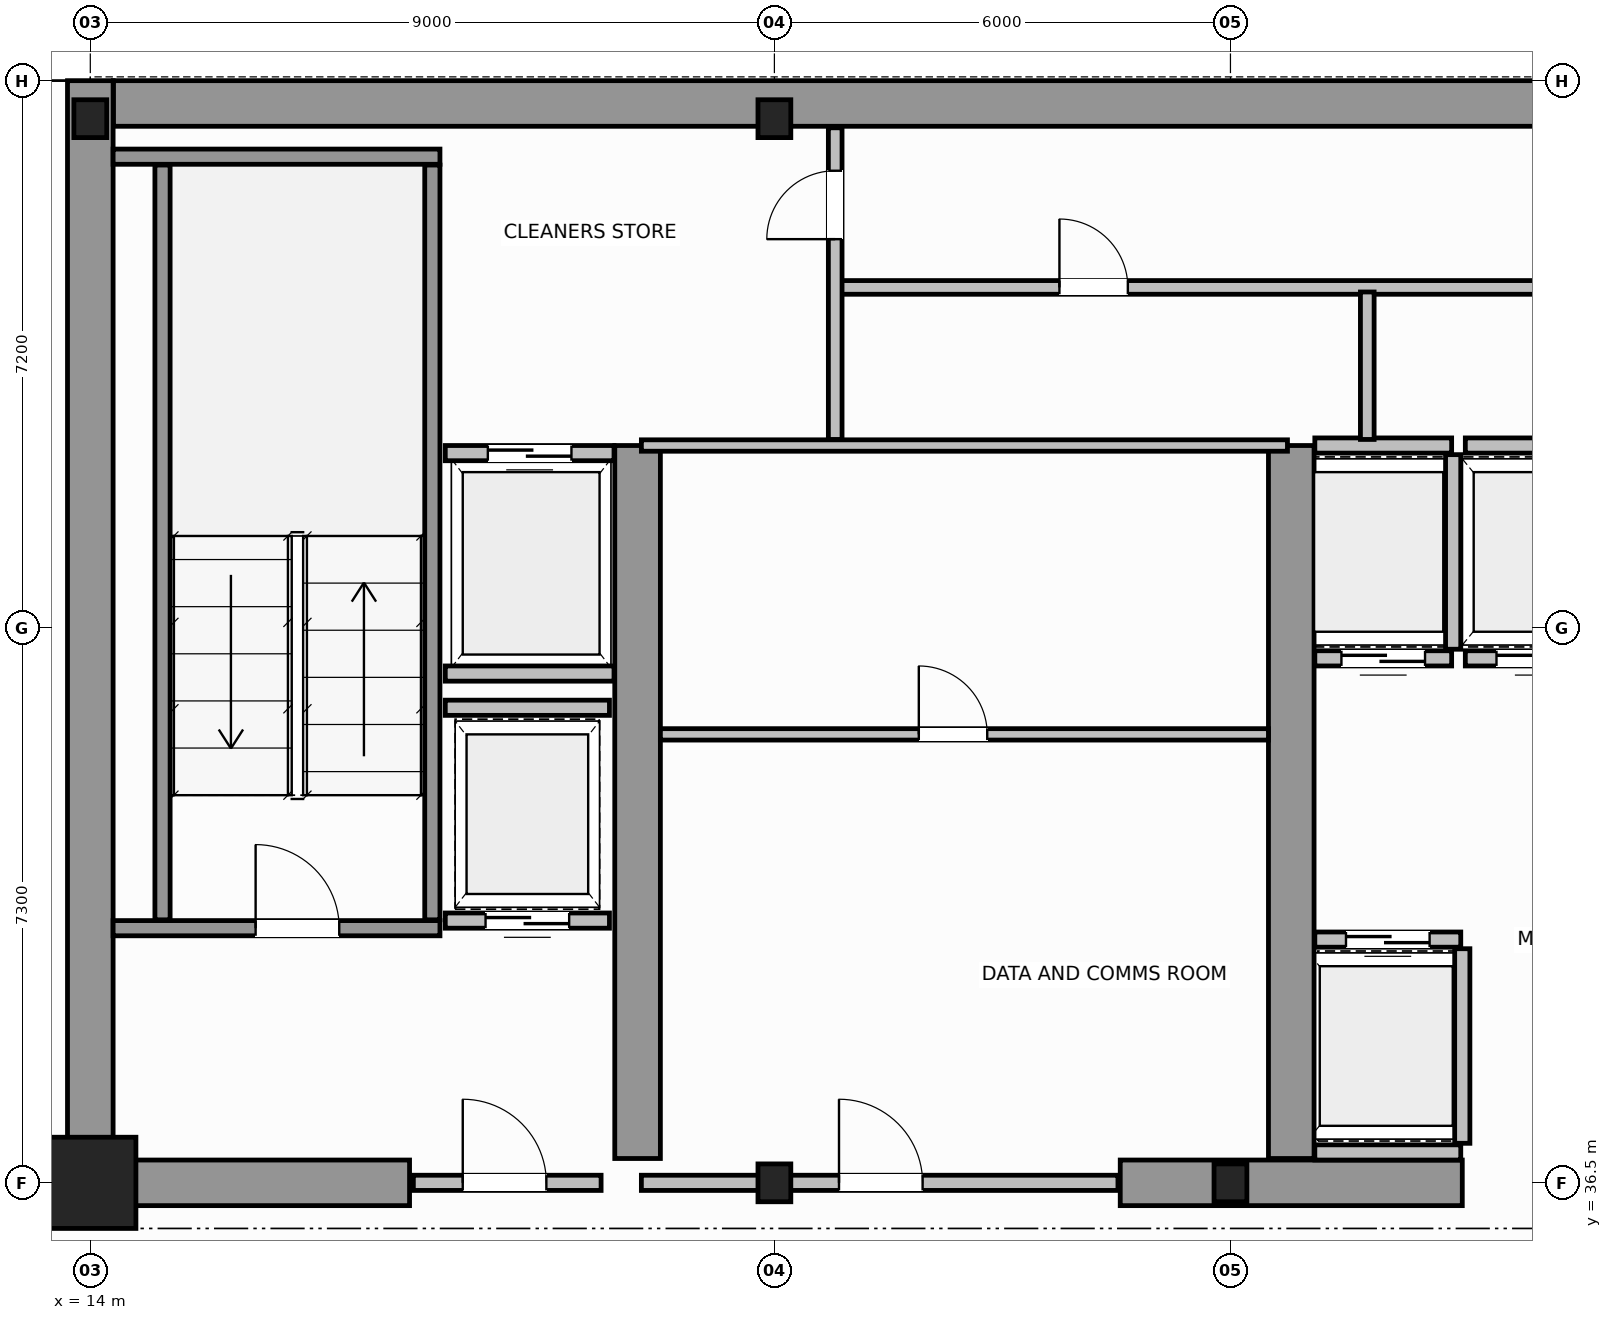
"""IFC4 building model, lengths in metres.
Left out: names, types, materials, properties, quantities, classifications, styles, units other than length and angle.
Written with IfcOpenShell. Run it as: python <this file> out.ifc"""

import sys

from ifc_helpers import new_model, si_unit, direction, frame, frame_2d, origin, origin_2d, place, context, subcontext, project, spatial, rectangle, i_section, extrude, source, transform, mapped, element, fill, save


model = new_model("IFC4")
c1 = context("Model", 3, precision=1e-05, world=origin(), true_north=direction((0.0, 1.0)))
c2 = subcontext(c1, "Body", "Model", "MODEL_VIEW")
j1 = project(units=[si_unit("LENGTHUNIT", "METRE"), si_unit("PLANEANGLEUNIT", "RADIAN")], contexts=[c1])
p1 = place(None, origin())
s1 = spatial("IfcSite", under=j1, at=p1, CompositionType="ELEMENT")
p2 = place(p1, origin())
s2 = spatial("IfcBuilding", under=s1, at=p2, CompositionType="ELEMENT")
p3 = place(p2, frame((0.0, 0.0, 184.2)))
s3 = spatial("IfcBuildingStorey", under=s2, at=p3, CompositionType="ELEMENT", Elevation=184.2)
m1 = source(origin(), c2, "Body", "SweptSolid", [
    extrude(rectangle(XDim=1.2, YDim=1.2, at=origin_2d()), origin(), (0.0, 0.0, 1.0), 3.8),
])
p4 = place(p3, frame((14.0, 36.5, 0.0), z_axis=(0.0, 0.0, 1.0), x_axis=(1.0, 0.0, 0.0)))
e1 = element("IfcColumn", 1, at=p4, inside=s3, PredefinedType="COLUMN", context=c2, shape_type="MappedRepresentation", body=[
    mapped(m1, transform((0.0, 0.0, 0.0), scale=1.0)),
])
m2 = source(origin(), c2, "Body", "SweptSolid", [
    extrude(i_section(OverallWidth=0.432, OverallDepth=0.498, WebThickness=0.055, FlangeThickness=0.068, FilletRadius=0.015, at=origin_2d()), origin(), (0.0, 0.0, 1.0), 3.8),
])
for number, where, z_axis, x_axis in (
    (2, (23.0, 36.5, 0.0), (0.0, 0.0, 1.0), (1.0, 0.0, 0.0)),
    (3, (29.0, 36.5, 0.0), (0.0, 0.0, 1.0), (1.0, 0.0, 0.0)),
    (4, (14.0, 50.5, 0.0), (0.0, 0.0, 1.0), (1.0, 0.0, 0.0)),
    (5, (23.0, 50.5, 0.0), (0.0, 0.0, 1.0), (1.0, 0.0, 0.0)),
):
    element("IfcColumn", number, at=place(p3, frame(where, z_axis=z_axis, x_axis=x_axis)), inside=s3, PredefinedType="COLUMN", context=c2, shape_type="MappedRepresentation", body=[
        mapped(m2, transform((0.0, 0.0, 0.0), scale=1.0)),
    ])
p5 = place(p3, frame((14.304, 50.7, 0.0), z_axis=(0.0, 0.0, 1.0), x_axis=(1.0, 0.0, 0.0)))
e6 = element("IfcWall", 6, at=p5, inside=s3, PredefinedType="SHEAR", context=c2, shape_type="SweptSolid", body=[
    extrude(rectangle(XDim=19.694, YDim=0.6, at=frame_2d((9.847, 0.0))), origin(), (0.0, 0.0, 1.0), 3.8),
])
p6 = place(p3, frame((14.0, 36.5, 0.0), z_axis=(0.0, 0.0, 1.0), x_axis=(0.0, 1.0, 0.0)))
e7 = element("IfcWall", 7, at=p6, inside=s3, PredefinedType="SHEAR", context=c2, shape_type="SweptSolid", body=[
    extrude(rectangle(XDim=14.5, YDim=0.6, at=frame_2d((7.25, 0.0))), origin(), (0.0, 0.0, 1.0), 3.8),
])
p7 = place(p3, frame((14.32, 36.5, 0.0), z_axis=(0.0, 0.0, 1.0), x_axis=(1.0, 0.0, 0.0)))
e8 = element("IfcWall", 8, at=p7, inside=s3, PredefinedType="SHEAR", context=c2, shape_type="SweptSolid", body=[
    extrude(rectangle(XDim=3.88, YDim=0.6, at=frame_2d((1.94, 0.0))), origin(), (0.0, 0.0, 1.0), 2.58),
])
p8 = place(p3, frame((27.55, 36.5, 0.0), z_axis=(0.0, 0.0, 1.0), x_axis=(1.0, 0.0, 0.0)))
e9 = element("IfcWall", 9, at=p8, inside=s3, PredefinedType="SHEAR", context=c2, shape_type="SweptSolid", body=[
    extrude(rectangle(XDim=4.5, YDim=0.6, at=frame_2d((2.25, 0.0))), origin(), (0.0, 0.0, 1.0), 3.8),
])
for number, where, z_axis, x_axis in (
    (10, (21.2, 36.82, 0.0), (0.0, 0.0, 1.0), (0.0, 1.0, 0.0)),
    (11, (29.8, 36.82, 0.0), (0.0, 0.0, 1.0), (0.0, 1.0, 0.0)),
):
    element("IfcWall", number, at=place(p3, frame(where, z_axis=z_axis, x_axis=x_axis)), inside=s3, PredefinedType="SHEAR", context=c2, shape_type="SweptSolid", body=[
        extrude(rectangle(XDim=9.38, YDim=0.6, at=frame_2d((4.69, 0.0))), origin(), (0.0, 0.0, 1.0), 3.8),
    ])
p9 = place(p3, frame((14.3, 39.85, 0.0), z_axis=(0.0, 0.0, 1.0), x_axis=(1.0, 0.0, 0.0)))
e12 = element("IfcWall", 12, at=p9, inside=s3, PredefinedType="SOLIDWALL", context=c2, shape_type="SweptSolid", body=[
    extrude(rectangle(XDim=4.3, YDim=0.2, at=frame_2d((2.15, 0.0))), origin(), (0.0, 0.0, 1.0), 3.8),
])
p10 = place(p9, frame((1.875, 0.0, 0.0)))
e13 = element("IfcOpeningElement", 13, at=p10, cuts=e12, PredefinedType="OPENING", context=c2, shape_type="SweptSolid", body=[
    extrude(rectangle(XDim=1.1, YDim=2.15, at=frame_2d((0.55, 1.075))), frame((0.0, 0.11, 0.0), z_axis=(0.0, -1.0, 0.0), x_axis=(1.0, 0.0, 0.0)), (0.0, 0.0, 1.0), 0.22),
])
p11 = place(p3, frame((14.3, 50.0, 0.0), z_axis=(0.0, 0.0, 1.0), x_axis=(1.0, 0.0, 0.0)))
e14 = element("IfcWall", 14, at=p11, inside=s3, PredefinedType="SOLIDWALL", context=c2, shape_type="SweptSolid", body=[
    extrude(rectangle(XDim=4.3, YDim=0.2, at=frame_2d((2.15, 0.0))), origin(), (0.0, 0.0, 1.0), 3.8),
])
for number, where, z_axis, x_axis in (
    (15, (14.95, 39.96, 0.0), (0.0, 0.0, 1.0), (0.0, 1.0, 0.0)),
    (16, (18.5, 39.96, 0.0), (0.0, 0.0, 1.0), (0.0, 1.0, 0.0)),
):
    element("IfcWall", number, at=place(p3, frame(where, z_axis=z_axis, x_axis=x_axis)), inside=s3, PredefinedType="SOLIDWALL", context=c2, shape_type="SweptSolid", body=[
        extrude(rectangle(XDim=9.93, YDim=0.2, at=frame_2d((4.965, 0.0))), origin(), (0.0, 0.0, 1.0), 3.8),
    ])
p12 = place(p3, frame((18.25, 36.5, 0.0), z_axis=(0.0, 0.0, 1.0), x_axis=(1.0, 0.0, 0.0)))
e17 = element("IfcWall", 17, at=p12, inside=s3, PredefinedType="SOLIDWALL", context=c2, shape_type="SweptSolid", body=[
    extrude(rectangle(XDim=2.47, YDim=0.2, at=frame_2d((1.235, 0.0))), origin(), (0.0, 0.0, 1.0), 2.57),
])
p13 = place(p12, frame((0.65, 0.0, 0.0)))
e18 = element("IfcOpeningElement", 18, at=p13, cuts=e17, PredefinedType="OPENING", context=c2, shape_type="SweptSolid", body=[
    extrude(rectangle(XDim=1.1, YDim=2.15, at=frame_2d((0.55, 1.075))), frame((0.0, 0.11, 0.0), z_axis=(0.0, -1.0, 0.0), x_axis=(1.0, 0.0, 0.0)), (0.0, 0.0, 1.0), 0.22),
])
p14 = place(p3, frame((30.11, 39.7, 0.0), z_axis=(0.0, 0.0, 1.0), x_axis=(1.0, 0.0, 0.0)))
e19 = element("IfcWall", 19, at=p14, inside=s3, PredefinedType="SOLIDWALL", context=c2, shape_type="SweptSolid", body=[
    extrude(rectangle(XDim=1.92, YDim=0.2, at=frame_2d((0.96, 0.0))), origin(), (0.0, 0.0, 1.0), 3.58),
])
p15 = place(p14, frame((0.41, 0.0, 0.0)))
e20 = element("IfcOpeningElement", 20, at=p15, cuts=e19, PredefinedType="OPENING", context=c2, shape_type="SweptSolid", body=[
    extrude(rectangle(XDim=1.1, YDim=2.15, at=frame_2d((0.55, 1.075))), frame((0.0, 0.11, 0.0), z_axis=(0.0, -1.0, 0.0), x_axis=(1.0, 0.0, 0.0)), (0.0, 0.0, 1.0), 0.22),
])
p16 = place(p3, frame((30.11, 36.9, 0.0), z_axis=(0.0, 0.0, 1.0), x_axis=(1.0, 0.0, 0.0)))
e21 = element("IfcWall", 21, at=p16, inside=s3, PredefinedType="SOLIDWALL", context=c2, shape_type="SweptSolid", body=[
    extrude(rectangle(XDim=1.92, YDim=0.2, at=frame_2d((0.96, 0.0))), origin(), (0.0, 0.0, 1.0), 3.58),
])
p17 = place(p3, frame((32.05, 37.02, 0.0), z_axis=(0.0, 0.0, 1.0), x_axis=(0.0, 1.0, 0.0)))
e22 = element("IfcWall", 22, at=p17, inside=s3, PredefinedType="SOLIDWALL", context=c2, shape_type="SweptSolid", body=[
    extrude(rectangle(XDim=2.56, YDim=0.2, at=frame_2d((1.28, 0.0))), origin(), (0.0, 0.0, 1.0), 3.58),
])
p18 = place(p3, frame((30.11, 43.4, 0.0), z_axis=(0.0, 0.0, 1.0), x_axis=(1.0, 0.0, 0.0)))
e23 = element("IfcWall", 23, at=p18, inside=s3, PredefinedType="SOLIDWALL", context=c2, shape_type="SweptSolid", body=[
    extrude(rectangle(XDim=1.8, YDim=0.2, at=frame_2d((0.9, 0.0))), origin(), (0.0, 0.0, 1.0), 3.58),
])
p19 = place(p18, frame((0.35, 0.0, 0.0)))
e24 = element("IfcOpeningElement", 24, at=p19, cuts=e23, PredefinedType="OPENING", context=c2, shape_type="SweptSolid", body=[
    extrude(rectangle(XDim=1.1, YDim=2.15, at=frame_2d((0.55, 1.075))), frame((0.0, 0.11, 0.0), z_axis=(0.0, -1.0, 0.0), x_axis=(1.0, 0.0, 0.0)), (0.0, 0.0, 1.0), 0.22),
])
p20 = place(p3, frame((30.11, 46.2, 0.0), z_axis=(0.0, 0.0, 1.0), x_axis=(1.0, 0.0, 0.0)))
e25 = element("IfcWall", 25, at=p20, inside=s3, PredefinedType="SOLIDWALL", context=c2, shape_type="SweptSolid", body=[
    extrude(rectangle(XDim=1.8, YDim=0.2, at=frame_2d((0.9, 0.0))), origin(), (0.0, 0.0, 1.0), 3.58),
])
p21 = place(p3, frame((31.93, 43.52, 0.0), z_axis=(0.0, 0.0, 1.0), x_axis=(0.0, 1.0, 0.0)))
e26 = element("IfcWall", 26, at=p21, inside=s3, PredefinedType="SOLIDWALL", context=c2, shape_type="SweptSolid", body=[
    extrude(rectangle(XDim=2.56, YDim=0.2, at=frame_2d((1.28, 0.0))), origin(), (0.0, 0.0, 1.0), 3.58),
])
p22 = place(p3, frame((32.09, 43.4, 0.0), z_axis=(0.0, 0.0, 1.0), x_axis=(1.0, 0.0, 0.0)))
e27 = element("IfcWall", 27, at=p22, inside=s3, PredefinedType="SOLIDWALL", context=c2, shape_type="SweptSolid", body=[
    extrude(rectangle(XDim=1.92, YDim=0.2, at=frame_2d((0.96, 0.0))), origin(), (0.0, 0.0, 1.0), 3.58),
])
p23 = place(p22, frame((0.41, 0.0, 0.0)))
e28 = element("IfcOpeningElement", 28, at=p23, cuts=e27, PredefinedType="OPENING", context=c2, shape_type="SweptSolid", body=[
    extrude(rectangle(XDim=1.1, YDim=2.15, at=frame_2d((0.55, 1.075))), frame((0.0, 0.11, 0.0), z_axis=(0.0, -1.0, 0.0), x_axis=(1.0, 0.0, 0.0)), (0.0, 0.0, 1.0), 0.22),
])
p24 = place(p3, frame((32.09, 46.2, 0.0), z_axis=(0.0, 0.0, 1.0), x_axis=(1.0, 0.0, 0.0)))
e29 = element("IfcWall", 29, at=p24, inside=s3, PredefinedType="SOLIDWALL", context=c2, shape_type="SweptSolid", body=[
    extrude(rectangle(XDim=1.92, YDim=0.2, at=frame_2d((0.96, 0.0))), origin(), (0.0, 0.0, 1.0), 3.58),
])
p25 = place(p3, frame((18.67, 46.1, 0.0), z_axis=(0.0, 0.0, 1.0), x_axis=(1.0, 0.0, 0.0)))
e30 = element("IfcWall", 30, at=p25, inside=s3, PredefinedType="SOLIDWALL", context=c2, shape_type="SweptSolid", body=[
    extrude(rectangle(XDim=2.22, YDim=0.2, at=frame_2d((1.11, 0.0))), origin(), (0.0, 0.0, 1.0), 3.58),
])
p26 = place(p25, frame((0.56, 0.0, 0.0)))
e31 = element("IfcOpeningElement", 31, at=p26, cuts=e30, PredefinedType="OPENING", context=c2, shape_type="SweptSolid", body=[
    extrude(rectangle(XDim=1.1, YDim=2.15, at=frame_2d((0.55, 1.075))), frame((0.0, 0.11, 0.0), z_axis=(0.0, -1.0, 0.0), x_axis=(1.0, 0.0, 0.0)), (0.0, 0.0, 1.0), 0.22),
])
p27 = place(p3, frame((18.67, 43.2, 0.0), z_axis=(0.0, 0.0, 1.0), x_axis=(1.0, 0.0, 0.0)))
e32 = element("IfcWall", 32, at=p27, inside=s3, PredefinedType="SOLIDWALL", context=c2, shape_type="SweptSolid", body=[
    extrude(rectangle(XDim=2.22, YDim=0.2, at=frame_2d((1.11, 0.0))), origin(), (0.0, 0.0, 1.0), 3.58),
])
p28 = place(p3, frame((18.67, 39.95, 0.0), z_axis=(0.0, 0.0, 1.0), x_axis=(1.0, 0.0, 0.0)))
e33 = element("IfcWall", 33, at=p28, inside=s3, PredefinedType="SOLIDWALL", context=c2, shape_type="SweptSolid", body=[
    extrude(rectangle(XDim=2.16, YDim=0.2, at=frame_2d((1.08, 0.0))), origin(), (0.0, 0.0, 1.0), 3.58),
])
p29 = place(p28, frame((0.53, 0.0, 0.0)))
e34 = element("IfcOpeningElement", 34, at=p29, cuts=e33, PredefinedType="OPENING", context=c2, shape_type="SweptSolid", body=[
    extrude(rectangle(XDim=1.1, YDim=2.15, at=frame_2d((0.55, 1.075))), frame((0.0, 0.11, 0.0), z_axis=(0.0, -1.0, 0.0), x_axis=(1.0, 0.0, 0.0)), (0.0, 0.0, 1.0), 0.22),
])
p30 = place(p3, frame((18.67, 42.75, 0.0), z_axis=(0.0, 0.0, 1.0), x_axis=(1.0, 0.0, 0.0)))
e35 = element("IfcWall", 35, at=p30, inside=s3, PredefinedType="SOLIDWALL", context=c2, shape_type="SweptSolid", body=[
    extrude(rectangle(XDim=2.16, YDim=0.2, at=frame_2d((1.08, 0.0))), origin(), (0.0, 0.0, 1.0), 3.58),
])
p31 = place(p3, frame((21.25, 36.5, 0.0), z_axis=(0.0, 0.0, 1.0), x_axis=(1.0, 0.0, 0.0)))
e36 = element("IfcWall", 36, at=p31, inside=s3, PredefinedType="SOLIDWALL", context=c2, shape_type="SweptSolid", body=[
    extrude(rectangle(XDim=6.27, YDim=0.2, at=frame_2d((3.135, 0.0))), origin(), (0.0, 0.0, 1.0), 2.57),
])
p32 = place(p31, frame((2.6, 0.0, 0.0)))
e37 = element("IfcOpeningElement", 37, at=p32, cuts=e36, PredefinedType="OPENING", context=c2, shape_type="SweptSolid", body=[
    extrude(rectangle(XDim=1.1, YDim=2.15, at=frame_2d((0.55, 1.075))), frame((0.0, 0.11, 0.0), z_axis=(0.0, -1.0, 0.0), x_axis=(1.0, 0.0, 0.0)), (0.0, 0.0, 1.0), 0.22),
])
p33 = place(p3, frame((21.25, 46.2, 0.0), z_axis=(0.0, 0.0, 1.0), x_axis=(1.0, 0.0, 0.0)))
e38 = element("IfcWall", 38, at=p33, inside=s3, PredefinedType="PARTITIONING", context=c2, shape_type="SweptSolid", body=[
    extrude(rectangle(XDim=8.5, YDim=0.15, at=frame_2d((4.25, 0.0))), origin(), (0.0, 0.0, 1.0), 3.58),
])
p34 = place(p3, frame((21.5, 42.4, 0.0), z_axis=(0.0, 0.0, 1.0), x_axis=(1.0, 0.0, 0.0)))
e39 = element("IfcWall", 39, at=p34, inside=s3, PredefinedType="PARTITIONING", context=c2, shape_type="SweptSolid", body=[
    extrude(rectangle(XDim=8.0, YDim=0.15, at=frame_2d((4.0, 0.0))), origin(), (0.0, 0.0, 1.0), 3.58),
])
p35 = place(p34, frame((3.4, 0.0, 0.0)))
e40 = element("IfcOpeningElement", 40, at=p35, cuts=e39, PredefinedType="OPENING", context=c2, shape_type="SweptSolid", body=[
    extrude(rectangle(XDim=0.9, YDim=2.1, at=frame_2d((0.45, 1.05))), frame((0.0, 0.085, 0.0), z_axis=(0.0, -1.0, 0.0), x_axis=(1.0, 0.0, 0.0)), (0.0, 0.0, 1.0), 0.17),
])
p36 = place(p3, frame((23.85, 48.28, 0.0), z_axis=(0.0, 0.0, 1.0), x_axis=(1.0, 0.0, 0.0)))
e41 = element("IfcWall", 41, at=p36, inside=s3, PredefinedType="PLUMBINGWALL", context=c2, shape_type="SweptSolid", body=[
    extrude(rectangle(XDim=15.03, YDim=0.18, at=frame_2d((7.515, 0.0))), origin(), (0.0, 0.0, 1.0), 3.58),
])
p37 = place(p36, frame((2.9, 0.0, 0.0)))
e42 = element("IfcOpeningElement", 42, at=p37, cuts=e41, PredefinedType="OPENING", context=c2, shape_type="SweptSolid", body=[
    extrude(rectangle(XDim=0.9, YDim=2.15, at=frame_2d((0.45, 1.075))), frame((0.0, 0.1, 0.0), z_axis=(0.0, -1.0, 0.0), x_axis=(1.0, 0.0, 0.0)), (0.0, 0.0, 1.0), 0.2),
])
p38 = place(p36, frame((10.4, 0.0, 0.0)))
e43 = element("IfcOpeningElement", 43, at=p38, cuts=e41, PredefinedType="OPENING", context=c2, shape_type="SweptSolid", body=[
    extrude(rectangle(XDim=0.9, YDim=2.15, at=frame_2d((0.45, 1.075))), frame((0.0, 0.1, 0.0), z_axis=(0.0, -1.0, 0.0), x_axis=(1.0, 0.0, 0.0)), (0.0, 0.0, 1.0), 0.2),
])
p39 = place(p3, frame((23.8, 46.28, 0.0), z_axis=(0.0, 0.0, 1.0), x_axis=(0.0, 1.0, 0.0)))
e44 = element("IfcWall", 44, at=p39, inside=s3, PredefinedType="PLUMBINGWALL", context=c2, shape_type="SweptSolid", body=[
    extrude(rectangle(XDim=4.1, YDim=0.18, at=frame_2d((2.05, 0.0))), origin(), (0.0, 0.0, 1.0), 3.58),
])
p40 = place(p39, frame((2.635, 0.0, 0.0)))
e45 = element("IfcOpeningElement", 45, at=p40, cuts=e44, PredefinedType="OPENING", context=c2, shape_type="SweptSolid", body=[
    extrude(rectangle(XDim=0.9, YDim=2.15, at=frame_2d((0.45, 1.075))), frame((0.0, 0.1, 0.0), z_axis=(0.0, -1.0, 0.0), x_axis=(1.0, 0.0, 0.0)), (0.0, 0.0, 1.0), 0.2),
])
p41 = place(p3, frame((30.8, 46.28, 0.0), z_axis=(0.0, 0.0, 1.0), x_axis=(0.0, 1.0, 0.0)))
e46 = element("IfcWall", 46, at=p41, inside=s3, PredefinedType="PLUMBINGWALL", context=c2, shape_type="SweptSolid", body=[
    extrude(rectangle(XDim=1.94, YDim=0.18, at=frame_2d((0.97, 0.0))), origin(), (0.0, 0.0, 1.0), 3.58),
])
p42 = place(p3, frame((7.289, 36.48, 0.0), z_axis=(0.0, 0.0, 1.0), x_axis=(1.0, 0.0, 0.0)))
e47 = element("IfcWall", 47, at=p42, inside=s3, PredefinedType="PARTITIONING", context=c2, shape_type="SweptSolid", body=[
    extrude(rectangle(XDim=6.651, YDim=0.12, at=frame_2d((3.325, 0.0))), origin(), (0.0, 0.0, 1.0), 2.97),
])
p43 = place(p42, frame((2.875, 0.0, 0.0)))
e48 = element("IfcOpeningElement", 48, at=p43, cuts=e47, PredefinedType="OPENING", context=c2, shape_type="SweptSolid", body=[
    extrude(rectangle(XDim=0.9, YDim=2.15, at=frame_2d((0.45, 1.075))), frame((0.0, 0.07, 0.0), z_axis=(0.0, -1.0, 0.0), x_axis=(1.0, 0.0, 0.0)), (0.0, 0.0, 1.0), 0.14),
])
m3 = source(origin(), c2, "Body", "SweptSolid", [
    extrude(rectangle(XDim=1.1, YDim=2.15, at=frame_2d((0.55, 1.075))), frame((0.0, 0.025, 0.0), z_axis=(0.0, -1.0, 0.0), x_axis=(1.0, 0.0, 0.0)), (0.0, 0.0, 1.0), 0.05),
])
p44 = place(p10, origin())
e49 = element("IfcDoor", 49, at=p44, inside=s3, OperationType="SINGLE_SWING_LEFT", PredefinedType="DOOR", context=c2, shape_type="MappedRepresentation", body=[
    mapped(m3, transform((0.0, 0.0, 0.0), scale=1.0)),
])
fill(e13, e49)
p45 = place(p13, origin())
e50 = element("IfcDoor", 50, at=p45, inside=s3, OperationType="SINGLE_SWING_RIGHT", PredefinedType="DOOR", context=c2, shape_type="MappedRepresentation", body=[
    mapped(m3, transform((0.0, 0.0, 0.0), scale=1.0)),
])
fill(e18, e50)
p46 = place(p15, origin())
e51 = element("IfcDoor", 51, at=p46, inside=s3, OperationType="DOUBLE_DOOR_SLIDING", PredefinedType="DOOR", context=c2, shape_type="MappedRepresentation", body=[
    mapped(m3, transform((0.0, 0.0, 0.0), scale=1.0)),
])
fill(e20, e51)
p47 = place(p19, origin())
e52 = element("IfcDoor", 52, at=p47, inside=s3, OperationType="DOUBLE_DOOR_SLIDING", PredefinedType="DOOR", context=c2, shape_type="MappedRepresentation", body=[
    mapped(m3, transform((0.0, 0.0, 0.0), scale=1.0)),
])
fill(e24, e52)
p48 = place(p23, origin())
e53 = element("IfcDoor", 53, at=p48, inside=s3, OperationType="DOUBLE_DOOR_SLIDING", PredefinedType="DOOR", context=c2, shape_type="MappedRepresentation", body=[
    mapped(m3, transform((0.0, 0.0, 0.0), scale=1.0)),
])
fill(e28, e53)
p49 = place(p26, origin())
e54 = element("IfcDoor", 54, at=p49, inside=s3, OperationType="DOUBLE_DOOR_SLIDING", PredefinedType="DOOR", context=c2, shape_type="MappedRepresentation", body=[
    mapped(m3, transform((0.0, 0.0, 0.0), scale=1.0)),
])
fill(e31, e54)
p50 = place(p29, origin())
e55 = element("IfcDoor", 55, at=p50, inside=s3, OperationType="DOUBLE_DOOR_SLIDING", PredefinedType="DOOR", context=c2, shape_type="MappedRepresentation", body=[
    mapped(m3, transform((0.0, 0.0, 0.0), scale=1.0)),
])
fill(e34, e55)
p51 = place(p32, origin())
e56 = element("IfcDoor", 56, at=p51, inside=s3, OperationType="SINGLE_SWING_LEFT", PredefinedType="DOOR", context=c2, shape_type="MappedRepresentation", body=[
    mapped(m3, transform((0.0, 0.0, 0.0), scale=1.0)),
])
fill(e37, e56)
m4 = source(origin(), c2, "Body", "SweptSolid", [
    extrude(rectangle(XDim=0.9, YDim=2.1, at=frame_2d((0.45, 1.05))), frame((0.0, 0.025, 0.0), z_axis=(0.0, -1.0, 0.0), x_axis=(1.0, 0.0, 0.0)), (0.0, 0.0, 1.0), 0.05),
])
p52 = place(p35, origin())
e57 = element("IfcDoor", 57, at=p52, inside=s3, OperationType="SINGLE_SWING_RIGHT", PredefinedType="DOOR", context=c2, shape_type="MappedRepresentation", body=[
    mapped(m4, transform((0.0, 0.0, 0.0), scale=1.0)),
])
fill(e40, e57)
m5 = source(origin(), c2, "Body", "SweptSolid", [
    extrude(rectangle(XDim=0.9, YDim=2.15, at=frame_2d((0.45, 1.075))), frame((0.0, 0.025, 0.0), z_axis=(0.0, -1.0, 0.0), x_axis=(1.0, 0.0, 0.0)), (0.0, 0.0, 1.0), 0.05),
])
p53 = place(p40, origin())
e58 = element("IfcDoor", 58, at=p53, inside=s3, OperationType="SINGLE_SWING_LEFT", PredefinedType="DOOR", context=c2, shape_type="MappedRepresentation", body=[
    mapped(m5, transform((0.0, 0.0, 0.0), scale=1.0)),
])
fill(e45, e58)
p54 = place(p37, origin())
e59 = element("IfcDoor", 59, at=p54, inside=s3, OperationType="SINGLE_SWING_RIGHT", PredefinedType="DOOR", context=c2, shape_type="MappedRepresentation", body=[
    mapped(m5, transform((0.0, 0.0, 0.0), scale=1.0)),
])
fill(e42, e59)
save(model, sys.argv[1])
